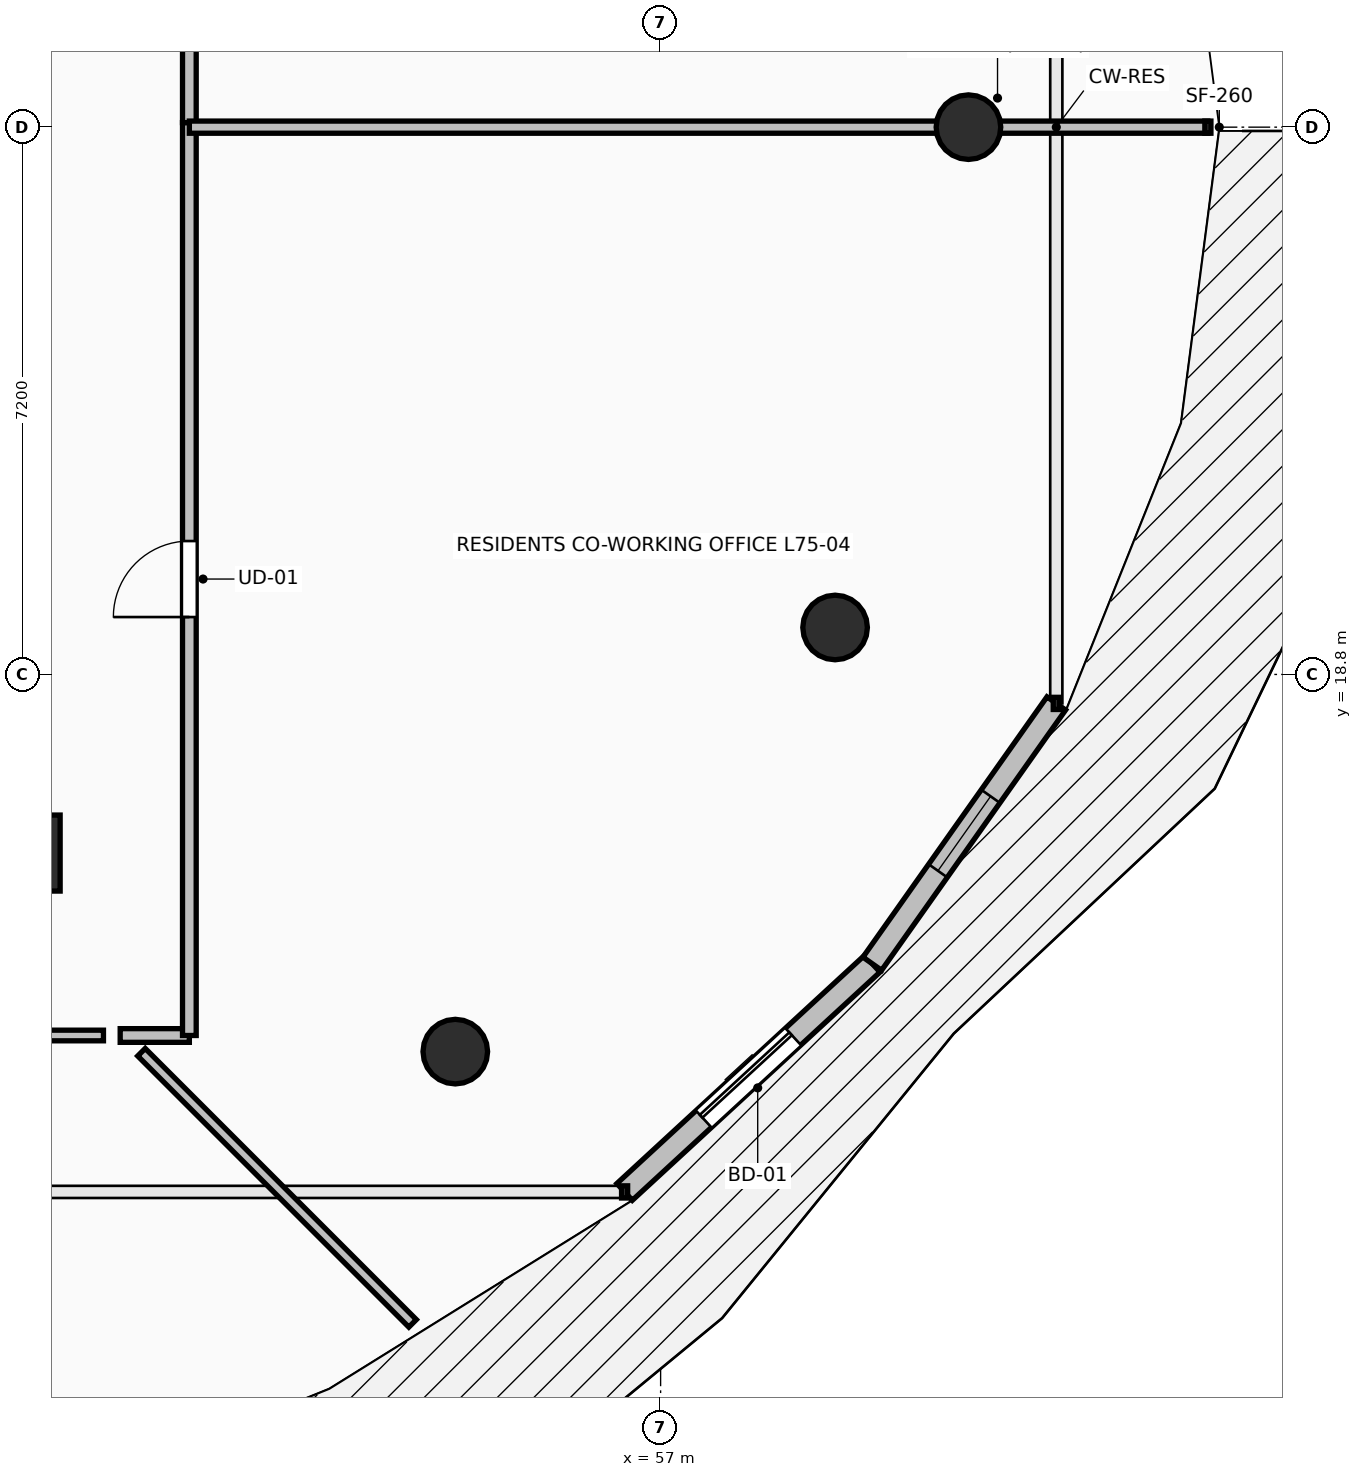
"""IFC4 building model, lengths in metres.
Left out: names, types, materials, properties, quantities, classifications, styles, units other than length and angle.
Written with IfcOpenShell. Run it as: python <this file> out.ifc"""

import sys

from ifc_helpers import new_model, si_unit, direction, frame, frame_2d, origin, origin_2d, place, context, subcontext, project, spatial, rectangle, circle, extrude, element, fill, save


model = new_model("IFC4")
c1 = context("Model", 3, precision=1e-05, world=origin(), true_north=direction((0.0, 1.0)))
c2 = subcontext(c1, "Body", "Model", "MODEL_VIEW")
j1 = project(units=[si_unit("LENGTHUNIT", "METRE"), si_unit("PLANEANGLEUNIT", "RADIAN")], contexts=[c1])
p1 = place(None, origin())
s1 = spatial("IfcSite", under=j1, at=p1, CompositionType="ELEMENT")
p2 = place(p1, origin())
s2 = spatial("IfcBuilding", under=s1, at=p2, CompositionType="ELEMENT")
p3 = place(p2, frame((0.0, 0.0, 276.85)))
s3 = spatial("IfcBuildingStorey", under=s2, at=p3, CompositionType="ELEMENT", Elevation=276.85)
for number, where, z_axis, x_axis in (
    (1, (61.05, 26.0, 0.0), (0.0, 0.0, 1.0), (1.0, 0.0, 0.0)),
    (2, (54.299, 13.838, 0.0), (0.0, 0.0, 1.0), (0.707, -0.707, 0.0)),
    (3, (59.295, 19.418, 0.0), (0.0, 0.0, 1.0), (0.924, -0.383, 0.0)),
):
    element("IfcColumn", number, at=place(p3, frame(where, z_axis=z_axis, x_axis=x_axis)), inside=s3, PredefinedType="COLUMN", context=c2, shape_type="SweptSolid", body=[
        extrude(circle(Radius=0.425, at=origin_2d()), origin(), (0.0, 0.0, 1.0), 3.55),
    ])
p4 = place(p3, frame((48.75, 16.45, 0.0), z_axis=(0.0, 0.0, 1.0), x_axis=(1.0, 0.0, 0.0)))
e4 = element("IfcColumn", 4, at=p4, inside=s3, PredefinedType="PILASTER", context=c2, shape_type="SweptSolid", body=[
    extrude(rectangle(XDim=0.7, YDim=1.0, at=origin_2d()), origin(), (0.0, 0.0, 1.0), 3.55),
])
p5 = place(p3, frame((56.526, 11.992, 0.0), z_axis=(0.0, 0.0, 1.0), x_axis=(0.735445373611, 0.677584018727, 0.0)))
e5 = element("IfcWall", 5, at=p5, inside=s3, PredefinedType="STANDARD", context=c2, shape_type="SweptSolid", body=[
    extrude(rectangle(XDim=4.43, YDim=0.3, at=frame_2d((2.215, 0.0))), origin(), (0.0, 0.0, 1.0), 3.19),
])
p6 = place(p5, frame((1.415, 0.0, 0.0)))
e6 = element("IfcOpeningElement", 6, at=p6, cuts=e5, PredefinedType="OPENING", context=c2, shape_type="SweptSolid", body=[
    extrude(rectangle(XDim=1.6, YDim=2.3, at=frame_2d((0.8, 1.15))), frame((0.0, 0.165, 0.0), z_axis=(0.0, -1.0, 0.0), x_axis=(1.0, 0.0, 0.0)), (0.0, 0.0, 1.0), 0.33),
])
p7 = place(p3, frame((59.784, 14.994, 0.0), z_axis=(0.0, 0.0, 1.0), x_axis=(0.577261247247, 0.816559521668, 0.0)))
e7 = element("IfcWall", 7, at=p7, inside=s3, PredefinedType="STANDARD", context=c2, shape_type="SweptSolid", body=[
    extrude(rectangle(XDim=4.194, YDim=0.3, at=frame_2d((2.097, 0.0))), origin(), (0.0, 0.0, 1.0), 3.19),
])
p8 = place(p7, frame((1.497, 0.0, 0.85)))
e8 = element("IfcOpeningElement", 8, at=p8, cuts=e7, PredefinedType="OPENING", context=c2, shape_type="SweptSolid", body=[
    extrude(rectangle(XDim=1.2, YDim=2.1, at=frame_2d((0.6, 1.05))), frame((0.0, 0.165, 0.0), z_axis=(0.0, -1.0, 0.0), x_axis=(1.0, 0.0, 0.0)), (0.0, 0.0, 1.0), 0.33),
])
p9 = place(p3, frame((49.89, 14.05, 0.0), z_axis=(0.0, 0.0, 1.0), x_axis=(1.0, 0.0, 0.0)))
e9 = element("IfcWall", 9, at=p9, inside=s3, PredefinedType="PARTITIONING", context=c2, shape_type="SweptSolid", body=[
    extrude(rectangle(XDim=0.91, YDim=0.18, at=frame_2d((0.455, 0.0))), origin(), (0.0, 0.0, 1.0), 3.19),
])
p10 = place(p3, frame((50.8, 14.05, 0.0), z_axis=(0.0, 0.0, 1.0), x_axis=(0.0, 1.0, 0.0)))
e10 = element("IfcWall", 10, at=p10, inside=s3, PredefinedType="PARTITIONING", context=c2, shape_type="SweptSolid", body=[
    extrude(rectangle(XDim=12.01, YDim=0.18, at=frame_2d((6.005, 0.0))), origin(), (0.0, 0.0, 1.0), 2.382),
])
p11 = place(p10, frame((5.505, 0.0, 0.0)))
e11 = element("IfcOpeningElement", 11, at=p11, cuts=e10, PredefinedType="OPENING", context=c2, shape_type="SweptSolid", body=[
    extrude(rectangle(XDim=1.0, YDim=2.15, at=frame_2d((0.5, 1.075))), frame((0.0, 0.105, 0.0), z_axis=(0.0, -1.0, 0.0), x_axis=(1.0, 0.0, 0.0)), (0.0, 0.0, 1.0), 0.21),
])
p12 = place(p3, frame((50.8, 26.06, 0.0), z_axis=(0.0, 0.0, 1.0), x_axis=(0.0, 1.0, 0.0)))
e12 = element("IfcWall", 12, at=p12, inside=s3, PredefinedType="PARTITIONING", context=c2, shape_type="SweptSolid", body=[
    extrude(rectangle(XDim=9.89, YDim=0.18, at=frame_2d((4.945, 0.0))), origin(), (0.0, 0.0, 1.0), 2.382),
])
p13 = place(p12, frame((4.445, 0.0, 0.0)))
e13 = element("IfcOpeningElement", 13, at=p13, cuts=e12, PredefinedType="OPENING", context=c2, shape_type="SweptSolid", body=[
    extrude(rectangle(XDim=1.0, YDim=2.15, at=frame_2d((0.5, 1.075))), frame((0.0, 0.105, 0.0), z_axis=(0.0, -1.0, 0.0), x_axis=(1.0, 0.0, 0.0)), (0.0, 0.0, 1.0), 0.21),
])
p14 = place(p3, frame((64.199, 26.0, 0.0), z_axis=(0.0, 0.0, 1.0), x_axis=(-1.0, 0.0, 0.0)))
e14 = element("IfcWall", 14, at=p14, inside=s3, PredefinedType="PARTITIONING", context=c2, shape_type="SweptSolid", body=[
    extrude(rectangle(XDim=13.399, YDim=0.16, at=frame_2d((6.699, 0.0))), origin(), (0.0, 0.0, 1.0), 2.382),
])
p15 = place(p3, frame((39.45, 14.05, 0.0), z_axis=(0.0, 0.0, 1.0), x_axis=(1.0, 0.0, 0.0)))
e15 = element("IfcWall", 15, at=p15, inside=s3, PredefinedType="PARTITIONING", context=c2, shape_type="SweptSolid", body=[
    extrude(rectangle(XDim=10.22, YDim=0.14, at=frame_2d((5.11, 0.0))), origin(), (0.0, 0.0, 1.0), 2.382),
])
p16 = place(p3, frame((50.17, 13.83, 0.0), z_axis=(0.0, 0.0, 1.0), x_axis=(0.707106781187, -0.707106781187, 0.0)))
e16 = element("IfcWall", 16, at=p16, inside=s3, PredefinedType="PARTITIONING", context=c2, shape_type="SweptSolid", body=[
    extrude(rectangle(XDim=5.045, YDim=0.14, at=frame_2d((2.522, 0.0))), origin(), (0.0, 0.0, 1.0), 2.774),
])
p17 = place(p6, origin())
e17 = element("IfcDoor", 17, at=p17, inside=s3, OperationType="SLIDING_TO_LEFT", PredefinedType="DOOR", context=c2, shape_type="SweptSolid", body=[
    extrude(rectangle(XDim=1.6, YDim=2.3, at=frame_2d((0.8, 1.15))), frame((0.0, 0.025, 0.0), z_axis=(0.0, -1.0, 0.0), x_axis=(1.0, 0.0, 0.0)), (0.0, 0.0, 1.0), 0.05),
])
fill(e6, e17)
p18 = place(p8, origin())
e18 = element("IfcWindow", 18, at=p18, inside=s3, PartitioningType="SINGLE_PANEL", PredefinedType="WINDOW", context=c2, shape_type="SweptSolid", body=[
    extrude(rectangle(XDim=1.2, YDim=2.1, at=frame_2d((0.6, 1.05))), frame((0.0, 0.03, 0.0), z_axis=(0.0, -1.0, 0.0), x_axis=(1.0, 0.0, 0.0)), (0.0, 0.0, 1.0), 0.06),
])
fill(e8, e18)
p19 = place(p11, origin())
e19 = element("IfcDoor", 19, at=p19, inside=s3, OperationType="SINGLE_SWING_LEFT", PredefinedType="DOOR", context=c2, shape_type="SweptSolid", body=[
    extrude(rectangle(XDim=1.0, YDim=2.15, at=frame_2d((0.5, 1.075))), frame((0.0, 0.025, 0.0), z_axis=(0.0, -1.0, 0.0), x_axis=(1.0, 0.0, 0.0)), (0.0, 0.0, 1.0), 0.05),
])
fill(e11, e19)
save(model, sys.argv[1])
